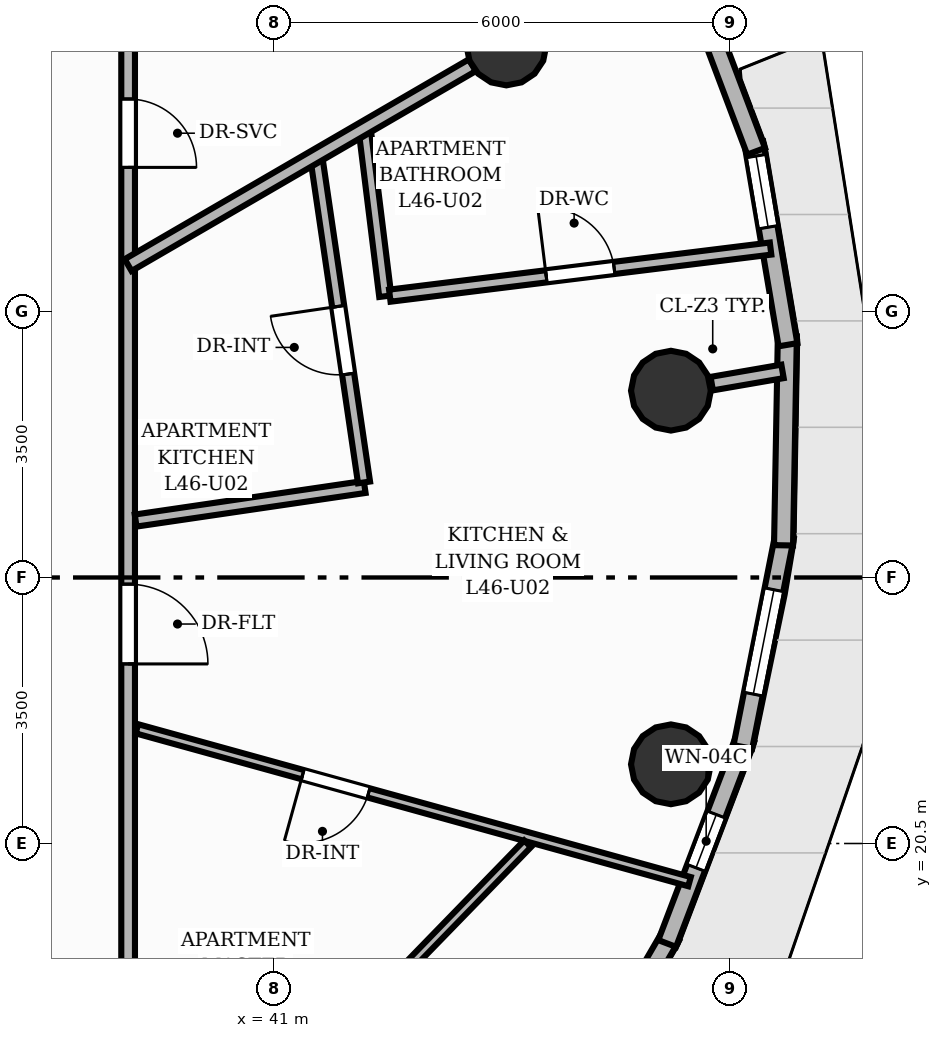
"""IFC4 building model, lengths in metres.
Left out: names, types, materials, properties, quantities, classifications, styles, units other than length and angle.
Written with IfcOpenShell. Run it as: python <this file> out.ifc"""

import sys

from ifc_helpers import new_model, si_unit, direction, frame, frame_2d, origin, origin_2d, place, context, subcontext, project, spatial, rectangle, circle, extrude, element, fill, save


model = new_model("IFC4")
c1 = context("Model", 3, precision=1e-05, world=origin(), true_north=direction((0.0, 1.0)))
c2 = subcontext(c1, "Body", "Model", "MODEL_VIEW")
j1 = project(units=[si_unit("LENGTHUNIT", "METRE"), si_unit("PLANEANGLEUNIT", "RADIAN")], contexts=[c1])
p1 = place(None, origin())
s1 = spatial("IfcSite", under=j1, at=p1, CompositionType="ELEMENT")
p2 = place(p1, origin())
s2 = spatial("IfcBuilding", under=s1, at=p2, CompositionType="ELEMENT")
p3 = place(p2, frame((0.0, 0.0, 155.36)))
s3 = spatial("IfcBuildingStorey", under=s2, at=p3, CompositionType="ELEMENT", Elevation=155.36)
for number, where, z_axis, x_axis in (
    (1, (46.221, 26.458, 0.0), (0.0, 0.0, 1.0), (1.0, 0.0, 0.0)),
    (2, (44.056, 31.0, 0.0), (0.0, 0.0, 1.0), (1.0, 0.0, 0.0)),
    (3, (46.221, 21.542, 0.0), (0.0, 0.0, 1.0), (1.0, 0.0, 0.0)),
):
    element("IfcColumn", number, at=place(p3, frame(where, z_axis=z_axis, x_axis=x_axis)), inside=s3, PredefinedType="COLUMN", context=c2, shape_type="SweptSolid", body=[
        extrude(circle(Radius=0.525, at=origin_2d()), origin(), (0.0, 0.0, 1.0), 3.2),
    ])
p4 = place(p3, frame((46.219, 19.283, 0.0), z_axis=(0.0, 0.0, 1.0), x_axis=(-0.502009170613, -0.864862296912, 0.0)))
e4 = element("IfcWall", 4, at=p4, inside=s3, PredefinedType="SOLIDWALL", context=c2, shape_type="SweptSolid", body=[
    extrude(rectangle(XDim=2.937, YDim=0.25, at=frame_2d((1.469, 0.0))), origin(), (0.0, 0.0, 1.0), 2.8),
])
p5 = place(p4, frame((0.768, 0.0, 0.85)))
e5 = element("IfcOpeningElement", 5, at=p5, cuts=e4, PredefinedType="OPENING", context=c2, shape_type="SweptSolid", body=[
    extrude(rectangle(XDim=1.4, YDim=1.55, at=frame_2d((0.7, 0.775))), frame((0.0, 0.135, 0.0), z_axis=(0.0, -1.0, 0.0), x_axis=(1.0, 0.0, 0.0)), (0.0, 0.0, 1.0), 0.27),
])
p6 = place(p3, frame((47.198, 21.877, 0.0), z_axis=(0.0, 0.0, 1.0), x_axis=(-0.356178525313, -0.934417924756, 0.0)))
e6 = element("IfcWall", 6, at=p6, inside=s3, PredefinedType="SOLIDWALL", context=c2, shape_type="SweptSolid", body=[
    extrude(rectangle(XDim=2.882, YDim=0.25, at=frame_2d((1.441, 0.0))), origin(), (0.0, 0.0, 1.0), 2.8),
])
p7 = place(p6, frame((1.066, 0.0, 0.85)))
e7 = element("IfcOpeningElement", 7, at=p7, cuts=e6, PredefinedType="OPENING", context=c2, shape_type="SweptSolid", body=[
    extrude(rectangle(XDim=0.75, YDim=1.55, at=frame_2d((0.375, 0.775))), frame((0.0, 0.135, 0.0), z_axis=(0.0, -1.0, 0.0), x_axis=(1.0, 0.0, 0.0)), (0.0, 0.0, 1.0), 0.27),
])
p8 = place(p3, frame((47.715, 24.534, 0.0), z_axis=(0.0, 0.0, 1.0), x_axis=(-0.194099406303, -0.980981865517, 0.0)))
e8 = element("IfcWall", 8, at=p8, inside=s3, PredefinedType="SOLIDWALL", context=c2, shape_type="SweptSolid", body=[
    extrude(rectangle(XDim=2.817, YDim=0.25, at=frame_2d((1.409, 0.0))), origin(), (0.0, 0.0, 1.0), 2.8),
])
p9 = place(p8, frame((0.709, 0.0, 0.85)))
e9 = element("IfcOpeningElement", 9, at=p9, cuts=e8, PredefinedType="OPENING", context=c2, shape_type="SweptSolid", body=[
    extrude(rectangle(XDim=1.4, YDim=1.55, at=frame_2d((0.7, 0.775))), frame((0.0, 0.135, 0.0), z_axis=(0.0, -1.0, 0.0), x_axis=(1.0, 0.0, 0.0)), (0.0, 0.0, 1.0), 0.27),
])
p10 = place(p3, frame((47.753, 27.175, 0.0), z_axis=(0.0, 0.0, 1.0), x_axis=(-0.018273942119, -0.999833017578, 0.0)))
e10 = element("IfcWall", 10, at=p10, inside=s3, PredefinedType="SOLIDWALL", context=c2, shape_type="SweptSolid", body=[
    extrude(rectangle(XDim=2.752, YDim=0.25, at=frame_2d((1.376, 0.0))), origin(), (0.0, 0.0, 1.0), 2.8),
])
p11 = place(p3, frame((47.313, 29.718, 0.0), z_axis=(0.0, 0.0, 1.0), x_axis=(0.166721354457, -0.9860040517, 0.0)))
e11 = element("IfcWall", 11, at=p11, inside=s3, PredefinedType="SOLIDWALL", context=c2, shape_type="SweptSolid", body=[
    extrude(rectangle(XDim=2.693, YDim=0.25, at=frame_2d((1.346, 0.0))), origin(), (0.0, 0.0, 1.0), 2.8),
])
p12 = place(p11, frame((0.175, 0.0, 0.85)))
e12 = element("IfcOpeningElement", 12, at=p12, cuts=e11, PredefinedType="OPENING", context=c2, shape_type="SweptSolid", body=[
    extrude(rectangle(XDim=0.95, YDim=1.45, at=frame_2d((0.475, 0.725))), frame((0.0, 0.135, 0.0), z_axis=(0.0, -1.0, 0.0), x_axis=(1.0, 0.0, 0.0)), (0.0, 0.0, 1.0), 0.27),
])
p13 = place(p3, frame((46.408, 32.086, 0.0), z_axis=(0.0, 0.0, 1.0), x_axis=(0.353022229402, -0.93561493444, 0.0)))
e13 = element("IfcWall", 13, at=p13, inside=s3, PredefinedType="SOLIDWALL", context=c2, shape_type="SweptSolid", body=[
    extrude(rectangle(XDim=2.648, YDim=0.25, at=frame_2d((1.324, 0.0))), origin(), (0.0, 0.0, 1.0), 2.8),
])
p14 = place(p3, frame((46.758, 26.551, 0.0), z_axis=(0.0, 0.0, 1.0), x_axis=(0.985363023372, 0.170469094476, 0.0)))
e14 = element("IfcWall", 14, at=p14, inside=s3, PredefinedType="PARTITIONING", context=c2, shape_type="SweptSolid", body=[
    extrude(rectangle(XDim=0.945, YDim=0.18, at=frame_2d((0.473, 0.0))), origin(), (0.0, 0.0, 1.0), 2.176),
])
p15 = place(p3, frame((39.08, 32.58, 0.0), z_axis=(0.0, 0.0, 1.0), x_axis=(0.0, -1.0, 0.0)))
e15 = element("IfcWall", 15, at=p15, inside=s3, PredefinedType="PARTITIONING", context=c2, shape_type="SweptSolid", body=[
    extrude(rectangle(XDim=17.16, YDim=0.18, at=frame_2d((8.58, 0.0))), origin(), (0.0, 0.0, 1.0), 2.795),
])
p16 = place(p15, frame((8.667, 0.0, 0.0)))
e16 = element("IfcOpeningElement", 16, at=p16, cuts=e15, PredefinedType="OPENING", context=c2, shape_type="SweptSolid", body=[
    extrude(rectangle(XDim=1.05, YDim=2.15, at=frame_2d((0.525, 1.075))), frame((0.0, 0.1, 0.0), z_axis=(0.0, -1.0, 0.0), x_axis=(1.0, 0.0, 0.0)), (0.0, 0.0, 1.0), 0.2),
])
p17 = place(p15, frame((2.284, 0.0, 0.0)))
e17 = element("IfcOpeningElement", 17, at=p17, cuts=e15, PredefinedType="OPENING", context=c2, shape_type="SweptSolid", body=[
    extrude(rectangle(XDim=0.9, YDim=2.1, at=frame_2d((0.45, 1.05))), frame((0.0, 0.1, 0.0), z_axis=(0.0, -1.0, 0.0), x_axis=(1.0, 0.0, 0.0)), (0.0, 0.0, 1.0), 0.2),
])
p18 = place(p3, frame((42.189, 29.916, 0.0), z_axis=(0.0, 0.0, 1.0), x_axis=(0.122809822633, -0.99243022297, 0.0)))
e18 = element("IfcWall", 18, at=p18, inside=s3, PredefinedType="PLUMBINGWALL", context=c2, shape_type="SweptSolid", body=[
    extrude(rectangle(XDim=2.232, YDim=0.16, at=frame_2d((1.116, 0.0))), origin(), (0.0, 0.0, 1.0), 2.795),
])
p19 = place(p3, frame((42.523, 27.708, 0.0), z_axis=(0.0, 0.0, 1.0), x_axis=(0.992432598709, 0.122790622685, 0.0)))
e19 = element("IfcWall", 19, at=p19, inside=s3, PredefinedType="PLUMBINGWALL", context=c2, shape_type="SweptSolid", body=[
    extrude(rectangle(XDim=5.048, YDim=0.16, at=frame_2d((2.524, 0.0))), origin(), (0.0, 0.0, 1.0), 2.532),
])
p20 = place(p19, frame((2.074, 0.0, 0.0)))
e20 = element("IfcOpeningElement", 20, at=p20, cuts=e19, PredefinedType="OPENING", context=c2, shape_type="SweptSolid", body=[
    extrude(rectangle(XDim=0.9, YDim=2.1, at=frame_2d((0.45, 1.05))), frame((0.0, 0.09, 0.0), z_axis=(0.0, -1.0, 0.0), x_axis=(1.0, 0.0, 0.0)), (0.0, 0.0, 1.0), 0.18),
])
p21 = place(p3, frame((46.466, 19.998, 0.0), z_axis=(0.0, 0.0, 1.0), x_axis=(-0.963794664313, 0.26664554195, 0.0)))
e21 = element("IfcWall", 21, at=p21, inside=s3, PredefinedType="PARTITIONING", context=c2, shape_type="SweptSolid", body=[
    extrude(rectangle(XDim=7.544, YDim=0.125, at=frame_2d((3.772, 0.0))), origin(), (0.0, 0.0, 1.0), 2.532),
])
p22 = place(p21, frame((4.381, 0.0, 0.0)))
e22 = element("IfcOpeningElement", 22, at=p22, cuts=e21, PredefinedType="OPENING", context=c2, shape_type="SweptSolid", body=[
    extrude(rectangle(XDim=0.9, YDim=2.1, at=frame_2d((0.45, 1.05))), frame((0.0, 0.073, 0.0), z_axis=(0.0, -1.0, 0.0), x_axis=(1.0, 0.0, 0.0)), (0.0, 0.0, 1.0), 0.145),
])
p23 = place(p3, frame((39.179, 24.749, 0.0), z_axis=(0.0, 0.0, 1.0), x_axis=(0.989395416792, 0.145247062726, 0.0)))
e23 = element("IfcWall", 23, at=p23, inside=s3, PredefinedType="PLUMBINGWALL", context=c2, shape_type="SweptSolid", body=[
    extrude(rectangle(XDim=3.046, YDim=0.16, at=frame_2d((1.523, 0.0))), origin(), (0.0, 0.0, 1.0), 2.795),
])
p24 = place(p3, frame((42.184, 25.251, 0.0), z_axis=(0.0, 0.0, 1.0), x_axis=(-0.145293261483, 0.989388633535, 0.0)))
e24 = element("IfcWall", 24, at=p24, inside=s3, PredefinedType="PLUMBINGWALL", context=c2, shape_type="SweptSolid", body=[
    extrude(rectangle(XDim=4.342, YDim=0.16, at=frame_2d((2.171, 0.0))), origin(), (0.0, 0.0, 1.0), 2.795),
])
p25 = place(p24, frame((1.441, 0.0, 0.0)))
e25 = element("IfcOpeningElement", 25, at=p25, cuts=e24, PredefinedType="OPENING", context=c2, shape_type="SweptSolid", body=[
    extrude(rectangle(XDim=0.9, YDim=2.1, at=frame_2d((0.45, 1.05))), frame((0.0, 0.09, 0.0), z_axis=(0.0, -1.0, 0.0), x_axis=(1.0, 0.0, 0.0)), (0.0, 0.0, 1.0), 0.18),
])
p26 = place(p3, frame((39.08, 28.111, 0.0), z_axis=(0.0, 0.0, 1.0), x_axis=(0.864768049288, 0.502171505495, 0.0)))
e26 = element("IfcWall", 26, at=p26, inside=s3, PredefinedType="PARTITIONING", context=c2, shape_type="SweptSolid", body=[
    extrude(rectangle(XDim=5.237, YDim=0.18, at=frame_2d((2.619, 0.0))), origin(), (0.0, 0.0, 1.0), 2.176),
])
p27 = place(p3, frame((44.336, 20.497, 0.0), z_axis=(0.0, 0.0, 1.0), x_axis=(-0.696857448942, -0.717209659621, 0.0)))
e27 = element("IfcWall", 27, at=p27, inside=s3, PredefinedType="PARTITIONING", context=c2, shape_type="SweptSolid", body=[
    extrude(rectangle(XDim=13.052, YDim=0.125, at=frame_2d((6.526, 0.0))), origin(), (0.0, 0.0, 1.0), 2.251),
])
p28 = place(p27, frame((5.516, 0.0, 0.0)))
e28 = element("IfcOpeningElement", 28, at=p28, cuts=e27, PredefinedType="OPENING", context=c2, shape_type="SweptSolid", body=[
    extrude(rectangle(XDim=0.9, YDim=2.1, at=frame_2d((0.45, 1.05))), frame((0.0, 0.073, 0.0), z_axis=(0.0, -1.0, 0.0), x_axis=(1.0, 0.0, 0.0)), (0.0, 0.0, 1.0), 0.145),
])
p29 = place(p7, origin())
e29 = element("IfcWindow", 29, at=p29, inside=s3, PartitioningType="SINGLE_PANEL", PredefinedType="WINDOW", context=c2, shape_type="SweptSolid", body=[
    extrude(rectangle(XDim=0.75, YDim=1.55, at=frame_2d((0.375, 0.775))), frame((0.0, 0.03, 0.0), z_axis=(0.0, -1.0, 0.0), x_axis=(1.0, 0.0, 0.0)), (0.0, 0.0, 1.0), 0.06),
])
fill(e7, e29)
p30 = place(p9, origin())
e30 = element("IfcWindow", 30, at=p30, inside=s3, PartitioningType="SINGLE_PANEL", PredefinedType="WINDOW", context=c2, shape_type="SweptSolid", body=[
    extrude(rectangle(XDim=1.4, YDim=1.55, at=frame_2d((0.7, 0.775))), frame((0.0, 0.03, 0.0), z_axis=(0.0, -1.0, 0.0), x_axis=(1.0, 0.0, 0.0)), (0.0, 0.0, 1.0), 0.06),
])
fill(e9, e30)
p31 = place(p12, origin())
e31 = element("IfcWindow", 31, at=p31, inside=s3, PartitioningType="SINGLE_PANEL", PredefinedType="WINDOW", context=c2, shape_type="SweptSolid", body=[
    extrude(rectangle(XDim=0.95, YDim=1.45, at=frame_2d((0.475, 0.725))), frame((0.0, 0.03, 0.0), z_axis=(0.0, -1.0, 0.0), x_axis=(1.0, 0.0, 0.0)), (0.0, 0.0, 1.0), 0.06),
])
fill(e12, e31)
p32 = place(p16, origin())
e32 = element("IfcDoor", 32, at=p32, inside=s3, OperationType="SINGLE_SWING_RIGHT", PredefinedType="DOOR", context=c2, shape_type="SweptSolid", body=[
    extrude(rectangle(XDim=1.05, YDim=2.15, at=frame_2d((0.525, 1.075))), frame((0.0, 0.025, 0.0), z_axis=(0.0, -1.0, 0.0), x_axis=(1.0, 0.0, 0.0)), (0.0, 0.0, 1.0), 0.05),
])
fill(e16, e32)
p33 = place(p20, origin())
e33 = element("IfcDoor", 33, at=p33, inside=s3, OperationType="SINGLE_SWING_LEFT", PredefinedType="DOOR", context=c2, shape_type="SweptSolid", body=[
    extrude(rectangle(XDim=0.9, YDim=2.1, at=frame_2d((0.45, 1.05))), frame((0.0, 0.025, 0.0), z_axis=(0.0, -1.0, 0.0), x_axis=(1.0, 0.0, 0.0)), (0.0, 0.0, 1.0), 0.05),
])
fill(e20, e33)
p34 = place(p22, origin())
e34 = element("IfcDoor", 34, at=p34, inside=s3, OperationType="SINGLE_SWING_RIGHT", PredefinedType="DOOR", context=c2, shape_type="SweptSolid", body=[
    extrude(rectangle(XDim=0.9, YDim=2.1, at=frame_2d((0.45, 1.05))), frame((0.0, 0.025, 0.0), z_axis=(0.0, -1.0, 0.0), x_axis=(1.0, 0.0, 0.0)), (0.0, 0.0, 1.0), 0.05),
])
fill(e22, e34)
p35 = place(p25, origin())
e35 = element("IfcDoor", 35, at=p35, inside=s3, OperationType="SINGLE_SWING_RIGHT", PredefinedType="DOOR", context=c2, shape_type="SweptSolid", body=[
    extrude(rectangle(XDim=0.9, YDim=2.1, at=frame_2d((0.45, 1.05))), frame((0.0, 0.025, 0.0), z_axis=(0.0, -1.0, 0.0), x_axis=(1.0, 0.0, 0.0)), (0.0, 0.0, 1.0), 0.05),
])
fill(e25, e35)
p36 = place(p17, origin())
e36 = element("IfcDoor", 36, at=p36, inside=s3, OperationType="SINGLE_SWING_RIGHT", PredefinedType="DOOR", context=c2, shape_type="SweptSolid", body=[
    extrude(rectangle(XDim=0.9, YDim=2.1, at=frame_2d((0.45, 1.05))), frame((0.0, 0.025, 0.0), z_axis=(0.0, -1.0, 0.0), x_axis=(1.0, 0.0, 0.0)), (0.0, 0.0, 1.0), 0.05),
])
fill(e17, e36)
save(model, sys.argv[1])
